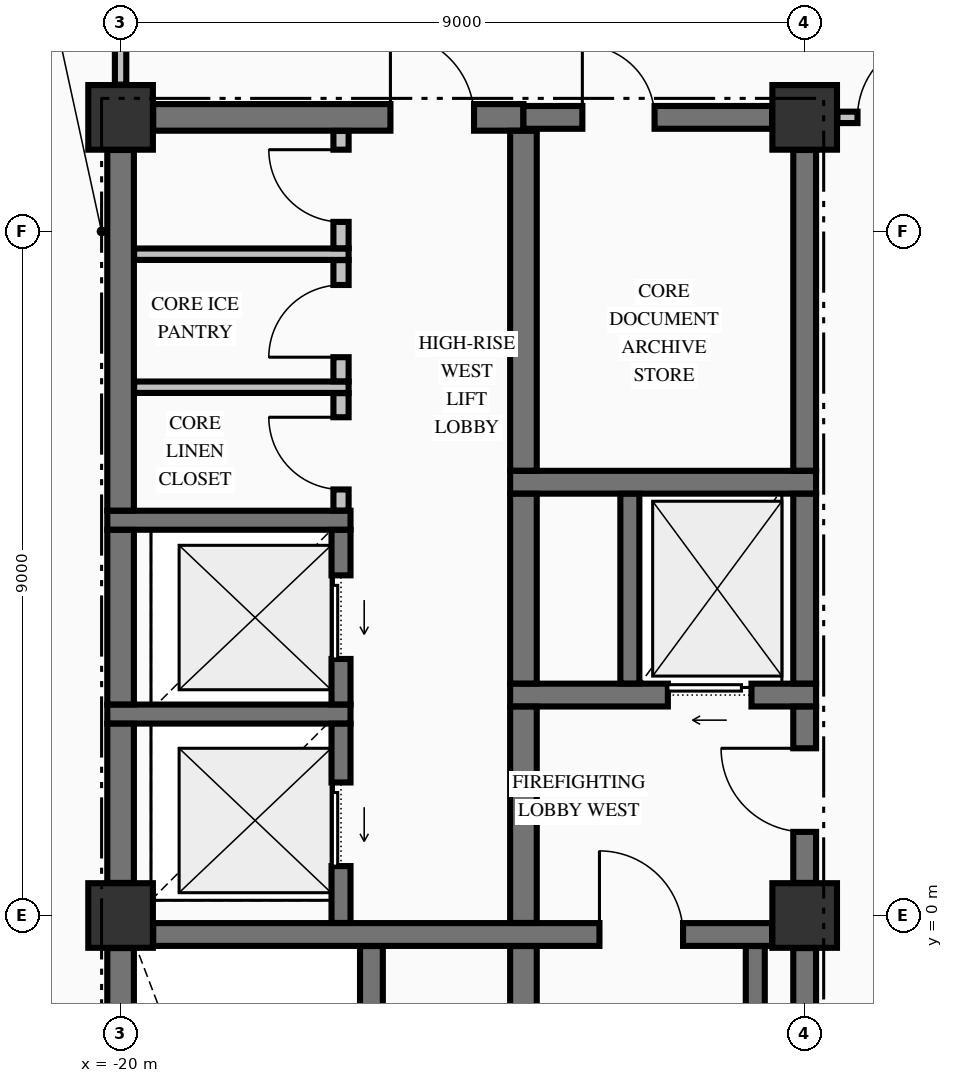
"""IFC4 building model, lengths in metres.
Left out: names, types, materials, properties, quantities, classifications, styles, units other than length and angle.
Written with IfcOpenShell. Run it as: python <this file> out.ifc"""

import sys

from ifc_helpers import new_model, si_unit, direction, frame, frame_2d, origin, origin_2d, place, context, subcontext, project, spatial, rectangle, extrude, element, fill, save


model = new_model("IFC4")
c1 = context("Model", 3, precision=1e-05, world=origin(), true_north=direction((0.0, 1.0)))
c2 = subcontext(c1, "Body", "Model", "MODEL_VIEW")
j1 = project(units=[si_unit("LENGTHUNIT", "METRE"), si_unit("PLANEANGLEUNIT", "RADIAN")], contexts=[c1])
p1 = place(None, origin())
s1 = spatial("IfcSite", under=j1, at=p1, CompositionType="ELEMENT")
p2 = place(p1, origin())
s2 = spatial("IfcBuilding", under=s1, at=p2, CompositionType="ELEMENT")
p3 = place(p2, frame((0.0, 0.0, 186.46)))
s3 = spatial("IfcBuildingStorey", under=s2, at=p3, CompositionType="ELEMENT", Elevation=186.46)
for number, where, z_axis, x_axis in (
    (1, (-20.0, 10.5, -0.425), (0.0, 0.0, 1.0), (1.0, 0.0, 0.0)),
    (2, (-11.0, 0.0, -0.425), (0.0, 0.0, 1.0), (1.0, 0.0, 0.0)),
    (3, (-11.0, 10.5, -0.425), (0.0, 0.0, 1.0), (1.0, 0.0, 0.0)),
    (4, (-20.0, 0.0, -0.425), (0.0, 0.0, 1.0), (1.0, 0.0, 0.0)),
):
    element("IfcColumn", number, at=place(p3, frame(where, z_axis=z_axis, x_axis=x_axis)), inside=s3, PredefinedType="COLUMN", context=c2, shape_type="SweptSolid", body=[
        extrude(rectangle(XDim=0.85, YDim=0.85, at=origin_2d()), origin(), (0.0, 0.0, 1.0), 5.0),
    ])
p4 = place(p3, frame((-19.571, -0.25, 0.0), z_axis=(0.0, 0.0, 1.0), x_axis=(1.0, 0.0, 0.0)))
e5 = element("IfcWall", 5, at=p4, inside=s3, PredefinedType="SHEAR", context=c2, shape_type="SweptSolid", body=[
    extrude(rectangle(XDim=8.142, YDim=0.3, at=frame_2d((4.071, 0.0))), origin(), (0.0, 0.0, 1.0), 4.575),
])
p5 = place(p4, frame((5.871, 0.0, 0.0)))
e6 = element("IfcOpeningElement", 6, at=p5, cuts=e5, PredefinedType="OPENING", context=c2, shape_type="SweptSolid", body=[
    extrude(rectangle(XDim=1.1, YDim=2.15, at=frame_2d((0.55, 1.075))), frame((0.0, 0.16, 0.0), z_axis=(0.0, -1.0, 0.0), x_axis=(1.0, 0.0, 0.0)), (0.0, 0.0, 1.0), 0.32),
])
p6 = place(p3, frame((-20.175, 2.65, 0.0), z_axis=(0.0, 0.0, 1.0), x_axis=(1.0, 0.0, 0.0)))
e7 = element("IfcWall", 7, at=p6, inside=s3, PredefinedType="SOLIDWALL", context=c2, shape_type="SweptSolid", body=[
    extrude(rectangle(XDim=3.2, YDim=0.25, at=frame_2d((1.6, 0.0))), origin(), (0.0, 0.0, 1.0), 4.575),
])
p7 = place(p3, frame((-14.875, 2.9, 0.0), z_axis=(0.0, 0.0, 1.0), x_axis=(1.0, 0.0, 0.0)))
e8 = element("IfcWall", 8, at=p7, inside=s3, PredefinedType="SHEAR", context=c2, shape_type="SweptSolid", body=[
    extrude(rectangle(XDim=4.025, YDim=0.3, at=frame_2d((2.012, 0.0))), origin(), (0.0, 0.0, 1.0), 4.575),
])
p8 = place(p7, frame((2.075, 0.0, 0.0)))
e9 = element("IfcOpeningElement", 9, at=p8, cuts=e8, PredefinedType="OPENING", context=c2, shape_type="SweptSolid", body=[
    extrude(rectangle(XDim=1.1, YDim=2.2, at=frame_2d((0.55, 1.1))), frame((0.0, 0.16, 0.0), z_axis=(0.0, -1.0, 0.0), x_axis=(1.0, 0.0, 0.0)), (0.0, 0.0, 1.0), 0.32),
])
p9 = place(p3, frame((-20.175, 5.2, 0.0), z_axis=(0.0, 0.0, 1.0), x_axis=(1.0, 0.0, 0.0)))
e10 = element("IfcWall", 10, at=p9, inside=s3, PredefinedType="SOLIDWALL", context=c2, shape_type="SweptSolid", body=[
    extrude(rectangle(XDim=3.2, YDim=0.25, at=frame_2d((1.6, 0.0))), origin(), (0.0, 0.0, 1.0), 4.575),
])
p10 = place(p3, frame((-14.875, 5.7, 0.0), z_axis=(0.0, 0.0, 1.0), x_axis=(1.0, 0.0, 0.0)))
e11 = element("IfcWall", 11, at=p10, inside=s3, PredefinedType="SHEAR", context=c2, shape_type="SweptSolid", body=[
    extrude(rectangle(XDim=4.025, YDim=0.3, at=frame_2d((2.012, 0.0))), origin(), (0.0, 0.0, 1.0), 4.575),
])
p11 = place(p3, frame((-19.571, 10.5, 0.0), z_axis=(0.0, 0.0, 1.0), x_axis=(1.0, 0.0, 0.0)))
e12 = element("IfcWall", 12, at=p11, inside=s3, PredefinedType="SHEAR", context=c2, shape_type="SweptSolid", body=[
    extrude(rectangle(XDim=4.871, YDim=0.35, at=frame_2d((2.436, 0.0))), origin(), (0.0, 0.0, 1.0), 4.575),
])
p12 = place(p11, frame((3.121, 0.0, 0.0)))
e13 = element("IfcOpeningElement", 13, at=p12, cuts=e12, PredefinedType="OPENING", context=c2, shape_type="SweptSolid", body=[
    extrude(rectangle(XDim=1.1, YDim=2.15, at=frame_2d((0.55, 1.075))), frame((0.0, 0.185, 0.0), z_axis=(0.0, -1.0, 0.0), x_axis=(1.0, 0.0, 0.0)), (0.0, 0.0, 1.0), 0.37),
])
p13 = place(p3, frame((-14.7, 10.5, 0.0), z_axis=(0.0, 0.0, 1.0), x_axis=(1.0, 0.0, 0.0)))
e14 = element("IfcWall", 14, at=p13, inside=s3, PredefinedType="SHEAR", context=c2, shape_type="SweptSolid", body=[
    extrude(rectangle(XDim=3.271, YDim=0.3, at=frame_2d((1.635, 0.0))), origin(), (0.0, 0.0, 1.0), 4.575),
])
p14 = place(p13, frame((0.775, 0.0, 0.0)))
e15 = element("IfcOpeningElement", 15, at=p14, cuts=e14, PredefinedType="OPENING", context=c2, shape_type="SweptSolid", body=[
    extrude(rectangle(XDim=0.95, YDim=2.15, at=frame_2d((0.475, 1.075))), frame((0.0, 0.16, 0.0), z_axis=(0.0, -1.0, 0.0), x_axis=(1.0, 0.0, 0.0)), (0.0, 0.0, 1.0), 0.32),
])
for number, where, z_axis, x_axis in (
    (16, (-19.822, 6.95, 0.0), (0.0, 0.0, 1.0), (1.0, 0.0, 0.0)),
    (17, (-19.822, 8.7, 0.0), (0.0, 0.0, 1.0), (1.0, 0.0, 0.0)),
):
    element("IfcWall", number, at=place(p3, frame(where, z_axis=z_axis, x_axis=x_axis)), inside=s3, PredefinedType="PARTITIONING", context=c2, shape_type="SweptSolid", body=[
        extrude(rectangle(XDim=2.822, YDim=0.15, at=frame_2d((1.411, 0.0))), origin(), (0.0, 0.0, 1.0), 4.575),
    ])
p15 = place(p3, frame((-10.569, 10.5, 0.0), z_axis=(0.0, 0.0, 1.0), x_axis=(1.0, 0.0, 0.0)))
e18 = element("IfcWall", 18, at=p15, inside=s3, PredefinedType="PARTITIONING", context=c2, shape_type="SweptSolid", body=[
    extrude(rectangle(XDim=21.138, YDim=0.15, at=frame_2d((10.569, 0.0))), origin(), (0.0, 0.0, 1.0), 4.575),
])
p16 = place(p15, frame((0.264, 0.0, 0.0)))
e19 = element("IfcOpeningElement", 19, at=p16, cuts=e18, PredefinedType="OPENING", context=c2, shape_type="SweptSolid", body=[
    extrude(rectangle(XDim=1.05, YDim=2.15, at=frame_2d((0.525, 1.075))), frame((0.0, 0.085, 0.0), z_axis=(0.0, -1.0, 0.0), x_axis=(1.0, 0.0, 0.0)), (0.0, 0.0, 1.0), 0.17),
])
p17 = place(p15, frame((19.824, 0.0, 0.0)))
e20 = element("IfcOpeningElement", 20, at=p17, cuts=e18, PredefinedType="OPENING", context=c2, shape_type="SweptSolid", body=[
    extrude(rectangle(XDim=1.05, YDim=2.15, at=frame_2d((0.525, 1.075))), frame((0.0, 0.085, 0.0), z_axis=(0.0, -1.0, 0.0), x_axis=(1.0, 0.0, 0.0)), (0.0, 0.0, 1.0), 0.17),
])
p18 = place(p3, frame((-20.0, -9.521, 0.0), z_axis=(0.0, 0.0, 1.0), x_axis=(0.0, 1.0, 0.0)))
e21 = element("IfcWall", 21, at=p18, inside=s3, PredefinedType="SHEAR", context=c2, shape_type="SweptSolid", body=[
    extrude(rectangle(XDim=9.092, YDim=0.35, at=frame_2d((4.546, 0.0))), origin(), (0.0, 0.0, 1.0), 4.575),
])
p19 = place(p3, frame((-20.0, 0.429, 0.0), z_axis=(0.0, 0.0, 1.0), x_axis=(0.0, 1.0, 0.0)))
e22 = element("IfcWall", 22, at=p19, inside=s3, PredefinedType="SHEAR", context=c2, shape_type="SweptSolid", body=[
    extrude(rectangle(XDim=2.094, YDim=0.35, at=frame_2d((1.047, 0.0))), origin(), (0.0, 0.0, 1.0), 4.575),
])
p20 = place(p3, frame((-20.0, 2.777, 0.0), z_axis=(0.0, 0.0, 1.0), x_axis=(0.0, 1.0, 0.0)))
e23 = element("IfcWall", 23, at=p20, inside=s3, PredefinedType="SHEAR", context=c2, shape_type="SweptSolid", body=[
    extrude(rectangle(XDim=2.296, YDim=0.35, at=frame_2d((1.148, 0.0))), origin(), (0.0, 0.0, 1.0), 4.575),
])
p21 = place(p3, frame((-20.0, 5.327, 0.0), z_axis=(0.0, 0.0, 1.0), x_axis=(0.0, 1.0, 0.0)))
e24 = element("IfcWall", 24, at=p21, inside=s3, PredefinedType="SHEAR", context=c2, shape_type="SweptSolid", body=[
    extrude(rectangle(XDim=4.744, YDim=0.35, at=frame_2d((2.372, 0.0))), origin(), (0.0, 0.0, 1.0), 4.575),
])
p22 = place(p3, frame((-17.1, -0.098, 0.0), z_axis=(0.0, 0.0, 1.0), x_axis=(0.0, 1.0, 0.0)))
e25 = element("IfcWall", 25, at=p22, inside=s3, PredefinedType="SOLIDWALL", context=c2, shape_type="SweptSolid", body=[
    extrude(rectangle(XDim=2.621, YDim=0.25, at=frame_2d((1.311, 0.0))), origin(), (0.0, 0.0, 1.0), 4.575),
])
p23 = place(p22, frame((0.748, 0.0, 0.0)))
e26 = element("IfcOpeningElement", 26, at=p23, cuts=e25, PredefinedType="OPENING", context=c2, shape_type="SweptSolid", body=[
    extrude(rectangle(XDim=1.1, YDim=2.2, at=frame_2d((0.55, 1.1))), frame((0.0, 0.135, 0.0), z_axis=(0.0, -1.0, 0.0), x_axis=(1.0, 0.0, 0.0)), (0.0, 0.0, 1.0), 0.27),
])
p24 = place(p3, frame((-17.1, 2.777, 0.0), z_axis=(0.0, 0.0, 1.0), x_axis=(0.0, 1.0, 0.0)))
e27 = element("IfcWall", 27, at=p24, inside=s3, PredefinedType="SOLIDWALL", context=c2, shape_type="SweptSolid", body=[
    extrude(rectangle(XDim=2.296, YDim=0.25, at=frame_2d((1.148, 0.0))), origin(), (0.0, 0.0, 1.0), 4.575),
])
p25 = place(p24, frame((0.598, 0.0, 0.0)))
e28 = element("IfcOpeningElement", 28, at=p25, cuts=e27, PredefinedType="OPENING", context=c2, shape_type="SweptSolid", body=[
    extrude(rectangle(XDim=1.1, YDim=2.2, at=frame_2d((0.55, 1.1))), frame((0.0, 0.135, 0.0), z_axis=(0.0, -1.0, 0.0), x_axis=(1.0, 0.0, 0.0)), (0.0, 0.0, 1.0), 0.27),
])
p26 = place(p3, frame((-16.7, -9.773, 0.0), z_axis=(0.0, 0.0, 1.0), x_axis=(0.0, 1.0, 0.0)))
e29 = element("IfcWall", 29, at=p26, inside=s3, PredefinedType="SHEAR", context=c2, shape_type="SweptSolid", body=[
    extrude(rectangle(XDim=9.371, YDim=0.3, at=frame_2d((4.686, 0.0))), origin(), (0.0, 0.0, 1.0), 4.575),
])
p27 = place(p3, frame((-14.7, -9.773, 0.0), z_axis=(0.0, 0.0, 1.0), x_axis=(0.0, 1.0, 0.0)))
e30 = element("IfcWall", 30, at=p27, inside=s3, PredefinedType="SHEAR", context=c2, shape_type="SweptSolid", body=[
    extrude(rectangle(XDim=9.371, YDim=0.35, at=frame_2d((4.686, 0.0))), origin(), (0.0, 0.0, 1.0), 4.575),
])
p28 = place(p3, frame((-14.7, -0.098, 0.0), z_axis=(0.0, 0.0, 1.0), x_axis=(0.0, 1.0, 0.0)))
e31 = element("IfcWall", 31, at=p28, inside=s3, PredefinedType="SHEAR", context=c2, shape_type="SweptSolid", body=[
    extrude(rectangle(XDim=2.846, YDim=0.35, at=frame_2d((1.423, 0.0))), origin(), (0.0, 0.0, 1.0), 4.575),
])
p29 = place(p3, frame((-14.7, 3.052, 0.0), z_axis=(0.0, 0.0, 1.0), x_axis=(0.0, 1.0, 0.0)))
e32 = element("IfcWall", 32, at=p29, inside=s3, PredefinedType="SHEAR", context=c2, shape_type="SweptSolid", body=[
    extrude(rectangle(XDim=2.496, YDim=0.35, at=frame_2d((1.248, 0.0))), origin(), (0.0, 0.0, 1.0), 4.575),
])
p30 = place(p3, frame((-14.7, 5.852, 0.0), z_axis=(0.0, 0.0, 1.0), x_axis=(0.0, 1.0, 0.0)))
e33 = element("IfcWall", 33, at=p30, inside=s3, PredefinedType="SHEAR", context=c2, shape_type="SweptSolid", body=[
    extrude(rectangle(XDim=4.471, YDim=0.35, at=frame_2d((2.235, 0.0))), origin(), (0.0, 0.0, 1.0), 4.575),
])
p31 = place(p3, frame((-13.3, 3.052, 0.0), z_axis=(0.0, 0.0, 1.0), x_axis=(0.0, 1.0, 0.0)))
e34 = element("IfcWall", 34, at=p31, inside=s3, PredefinedType="SOLIDWALL", context=c2, shape_type="SweptSolid", body=[
    extrude(rectangle(XDim=2.496, YDim=0.25, at=frame_2d((1.248, 0.0))), origin(), (0.0, 0.0, 1.0), 4.575),
])
p32 = place(p3, frame((-11.65, -9.798, 0.0), z_axis=(0.0, 0.0, 1.0), x_axis=(0.0, 1.0, 0.0)))
e35 = element("IfcWall", 35, at=p32, inside=s3, PredefinedType="SOLIDWALL", context=c2, shape_type="SweptSolid", body=[
    extrude(rectangle(XDim=9.396, YDim=0.25, at=frame_2d((4.698, 0.0))), origin(), (0.0, 0.0, 1.0), 4.575),
])
p33 = place(p3, frame((-11.0, -9.521, 0.0), z_axis=(0.0, 0.0, 1.0), x_axis=(0.0, 1.0, 0.0)))
e36 = element("IfcWall", 36, at=p33, inside=s3, PredefinedType="SHEAR", context=c2, shape_type="SweptSolid", body=[
    extrude(rectangle(XDim=9.092, YDim=0.3, at=frame_2d((4.546, 0.0))), origin(), (0.0, 0.0, 1.0), 4.575),
])
p34 = place(p3, frame((-11.0, 0.429, 0.0), z_axis=(0.0, 0.0, 1.0), x_axis=(0.0, 1.0, 0.0)))
e37 = element("IfcWall", 37, at=p34, inside=s3, PredefinedType="SHEAR", context=c2, shape_type="SweptSolid", body=[
    extrude(rectangle(XDim=2.319, YDim=0.3, at=frame_2d((1.16, 0.0))), origin(), (0.0, 0.0, 1.0), 4.575),
])
p35 = place(p34, frame((0.671, 0.0, 0.0)))
e38 = element("IfcOpeningElement", 38, at=p35, cuts=e37, PredefinedType="OPENING", context=c2, shape_type="SweptSolid", body=[
    extrude(rectangle(XDim=1.1, YDim=2.15, at=frame_2d((0.55, 1.075))), frame((0.0, 0.16, 0.0), z_axis=(0.0, -1.0, 0.0), x_axis=(1.0, 0.0, 0.0)), (0.0, 0.0, 1.0), 0.32),
])
p36 = place(p3, frame((-11.0, 3.052, 0.0), z_axis=(0.0, 0.0, 1.0), x_axis=(0.0, 1.0, 0.0)))
e39 = element("IfcWall", 39, at=p36, inside=s3, PredefinedType="SHEAR", context=c2, shape_type="SweptSolid", body=[
    extrude(rectangle(XDim=2.496, YDim=0.3, at=frame_2d((1.248, 0.0))), origin(), (0.0, 0.0, 1.0), 4.575),
])
p37 = place(p3, frame((-11.0, 5.852, 0.0), z_axis=(0.0, 0.0, 1.0), x_axis=(0.0, 1.0, 0.0)))
e40 = element("IfcWall", 40, at=p37, inside=s3, PredefinedType="SHEAR", context=c2, shape_type="SweptSolid", body=[
    extrude(rectangle(XDim=4.219, YDim=0.3, at=frame_2d((2.109, 0.0))), origin(), (0.0, 0.0, 1.0), 4.575),
])
p38 = place(p3, frame((-20.0, 10.931, 0.0), z_axis=(0.0, 0.0, 1.0), x_axis=(0.0, 1.0, 0.0)))
e41 = element("IfcWall", 41, at=p38, inside=s3, PredefinedType="PARTITIONING", context=c2, shape_type="SweptSolid", body=[
    extrude(rectangle(XDim=1.541, YDim=0.15, at=frame_2d((0.771, 0.0))), origin(), (0.0, 0.0, 1.0), 3.767),
])
p39 = place(p3, frame((-17.1, 5.328, 0.0), z_axis=(0.0, 0.0, 1.0), x_axis=(0.0, 1.0, 0.0)))
e42 = element("IfcWall", 42, at=p39, inside=s3, PredefinedType="PARTITIONING", context=c2, shape_type="SweptSolid", body=[
    extrude(rectangle(XDim=1.544, YDim=0.2, at=frame_2d((0.772, 0.0))), origin(), (0.0, 0.0, 1.0), 4.575),
])
p40 = place(p39, frame((0.277, 0.0, 0.0)))
e43 = element("IfcOpeningElement", 43, at=p40, cuts=e42, PredefinedType="OPENING", context=c2, shape_type="SweptSolid", body=[
    extrude(rectangle(XDim=0.95, YDim=2.15, at=frame_2d((0.475, 1.075))), frame((0.0, 0.11, 0.0), z_axis=(0.0, -1.0, 0.0), x_axis=(1.0, 0.0, 0.0)), (0.0, 0.0, 1.0), 0.22),
])
p41 = place(p3, frame((-17.1, 7.028, 0.0), z_axis=(0.0, 0.0, 1.0), x_axis=(0.0, 1.0, 0.0)))
e44 = element("IfcWall", 44, at=p41, inside=s3, PredefinedType="PARTITIONING", context=c2, shape_type="SweptSolid", body=[
    extrude(rectangle(XDim=1.594, YDim=0.2, at=frame_2d((0.797, 0.0))), origin(), (0.0, 0.0, 1.0), 4.575),
])
p42 = place(p41, frame((0.317, 0.0, 0.0)))
e45 = element("IfcOpeningElement", 45, at=p42, cuts=e44, PredefinedType="OPENING", context=c2, shape_type="SweptSolid", body=[
    extrude(rectangle(XDim=0.95, YDim=2.15, at=frame_2d((0.475, 1.075))), frame((0.0, 0.11, 0.0), z_axis=(0.0, -1.0, 0.0), x_axis=(1.0, 0.0, 0.0)), (0.0, 0.0, 1.0), 0.22),
])
p43 = place(p3, frame((-17.1, 8.778, 0.0), z_axis=(0.0, 0.0, 1.0), x_axis=(0.0, 1.0, 0.0)))
e46 = element("IfcWall", 46, at=p43, inside=s3, PredefinedType="PARTITIONING", context=c2, shape_type="SweptSolid", body=[
    extrude(rectangle(XDim=1.544, YDim=0.2, at=frame_2d((0.772, 0.0))), origin(), (0.0, 0.0, 1.0), 4.575),
])
p44 = place(p43, frame((0.347, 0.0, 0.0)))
e47 = element("IfcOpeningElement", 47, at=p44, cuts=e46, PredefinedType="OPENING", context=c2, shape_type="SweptSolid", body=[
    extrude(rectangle(XDim=0.95, YDim=2.15, at=frame_2d((0.475, 1.075))), frame((0.0, 0.11, 0.0), z_axis=(0.0, -1.0, 0.0), x_axis=(1.0, 0.0, 0.0)), (0.0, 0.0, 1.0), 0.22),
])
p45 = place(p5, origin())
e48 = element("IfcDoor", 48, at=p45, inside=s3, OperationType="SINGLE_SWING_LEFT", PredefinedType="DOOR", context=c2, shape_type="SweptSolid", body=[
    extrude(rectangle(XDim=1.1, YDim=2.15, at=frame_2d((0.55, 1.075))), frame((0.0, 0.025, 0.0), z_axis=(0.0, -1.0, 0.0), x_axis=(1.0, 0.0, 0.0)), (0.0, 0.0, 1.0), 0.05),
])
fill(e6, e48)
p46 = place(p35, origin())
e49 = element("IfcDoor", 49, at=p46, inside=s3, OperationType="SINGLE_SWING_RIGHT", PredefinedType="DOOR", context=c2, shape_type="SweptSolid", body=[
    extrude(rectangle(XDim=1.1, YDim=2.15, at=frame_2d((0.55, 1.075))), frame((0.0, 0.025, 0.0), z_axis=(0.0, -1.0, 0.0), x_axis=(1.0, 0.0, 0.0)), (0.0, 0.0, 1.0), 0.05),
])
fill(e38, e49)
p47 = place(p8, origin())
e50 = element("IfcDoor", 50, at=p47, inside=s3, OperationType="SLIDING_TO_LEFT", PredefinedType="DOOR", context=c2, shape_type="SweptSolid", body=[
    extrude(rectangle(XDim=1.1, YDim=2.2, at=frame_2d((0.55, 1.1))), frame((0.0, 0.025, 0.0), z_axis=(0.0, -1.0, 0.0), x_axis=(1.0, 0.0, 0.0)), (0.0, 0.0, 1.0), 0.05),
])
fill(e9, e50)
p48 = place(p14, origin())
e51 = element("IfcDoor", 51, at=p48, inside=s3, OperationType="SINGLE_SWING_LEFT", PredefinedType="DOOR", context=c2, shape_type="SweptSolid", body=[
    extrude(rectangle(XDim=0.95, YDim=2.15, at=frame_2d((0.475, 1.075))), frame((0.0, 0.025, 0.0), z_axis=(0.0, -1.0, 0.0), x_axis=(1.0, 0.0, 0.0)), (0.0, 0.0, 1.0), 0.05),
])
fill(e15, e51)
p49 = place(p23, origin())
e52 = element("IfcDoor", 52, at=p49, inside=s3, OperationType="SLIDING_TO_LEFT", PredefinedType="DOOR", context=c2, shape_type="SweptSolid", body=[
    extrude(rectangle(XDim=1.1, YDim=2.2, at=frame_2d((0.55, 1.1))), frame((0.0, 0.025, 0.0), z_axis=(0.0, -1.0, 0.0), x_axis=(1.0, 0.0, 0.0)), (0.0, 0.0, 1.0), 0.05),
])
fill(e26, e52)
p50 = place(p25, origin())
e53 = element("IfcDoor", 53, at=p50, inside=s3, OperationType="SLIDING_TO_LEFT", PredefinedType="DOOR", context=c2, shape_type="SweptSolid", body=[
    extrude(rectangle(XDim=1.1, YDim=2.2, at=frame_2d((0.55, 1.1))), frame((0.0, 0.025, 0.0), z_axis=(0.0, -1.0, 0.0), x_axis=(1.0, 0.0, 0.0)), (0.0, 0.0, 1.0), 0.05),
])
fill(e28, e53)
p51 = place(p12, origin())
e54 = element("IfcDoor", 54, at=p51, inside=s3, OperationType="SINGLE_SWING_LEFT", PredefinedType="DOOR", context=c2, shape_type="SweptSolid", body=[
    extrude(rectangle(XDim=1.1, YDim=2.15, at=frame_2d((0.55, 1.075))), frame((0.0, 0.025, 0.0), z_axis=(0.0, -1.0, 0.0), x_axis=(1.0, 0.0, 0.0)), (0.0, 0.0, 1.0), 0.05),
])
fill(e13, e54)
p52 = place(p44, origin())
e55 = element("IfcDoor", 55, at=p52, inside=s3, OperationType="SINGLE_SWING_RIGHT", PredefinedType="DOOR", context=c2, shape_type="SweptSolid", body=[
    extrude(rectangle(XDim=0.95, YDim=2.15, at=frame_2d((0.475, 1.075))), frame((0.0, 0.025, 0.0), z_axis=(0.0, -1.0, 0.0), x_axis=(1.0, 0.0, 0.0)), (0.0, 0.0, 1.0), 0.05),
])
fill(e47, e55)
p53 = place(p42, origin())
e56 = element("IfcDoor", 56, at=p53, inside=s3, OperationType="SINGLE_SWING_LEFT", PredefinedType="DOOR", context=c2, shape_type="SweptSolid", body=[
    extrude(rectangle(XDim=0.95, YDim=2.15, at=frame_2d((0.475, 1.075))), frame((0.0, 0.025, 0.0), z_axis=(0.0, -1.0, 0.0), x_axis=(1.0, 0.0, 0.0)), (0.0, 0.0, 1.0), 0.05),
])
fill(e45, e56)
p54 = place(p40, origin())
e57 = element("IfcDoor", 57, at=p54, inside=s3, OperationType="SINGLE_SWING_RIGHT", PredefinedType="DOOR", context=c2, shape_type="SweptSolid", body=[
    extrude(rectangle(XDim=0.95, YDim=2.15, at=frame_2d((0.475, 1.075))), frame((0.0, 0.025, 0.0), z_axis=(0.0, -1.0, 0.0), x_axis=(1.0, 0.0, 0.0)), (0.0, 0.0, 1.0), 0.05),
])
fill(e43, e57)
p55 = place(p16, origin())
e58 = element("IfcDoor", 58, at=p55, inside=s3, OperationType="SINGLE_SWING_RIGHT", PredefinedType="DOOR", context=c2, shape_type="SweptSolid", body=[
    extrude(rectangle(XDim=1.05, YDim=2.15, at=frame_2d((0.525, 1.075))), frame((0.0, 0.025, 0.0), z_axis=(0.0, -1.0, 0.0), x_axis=(1.0, 0.0, 0.0)), (0.0, 0.0, 1.0), 0.05),
])
fill(e19, e58)
save(model, sys.argv[1])
